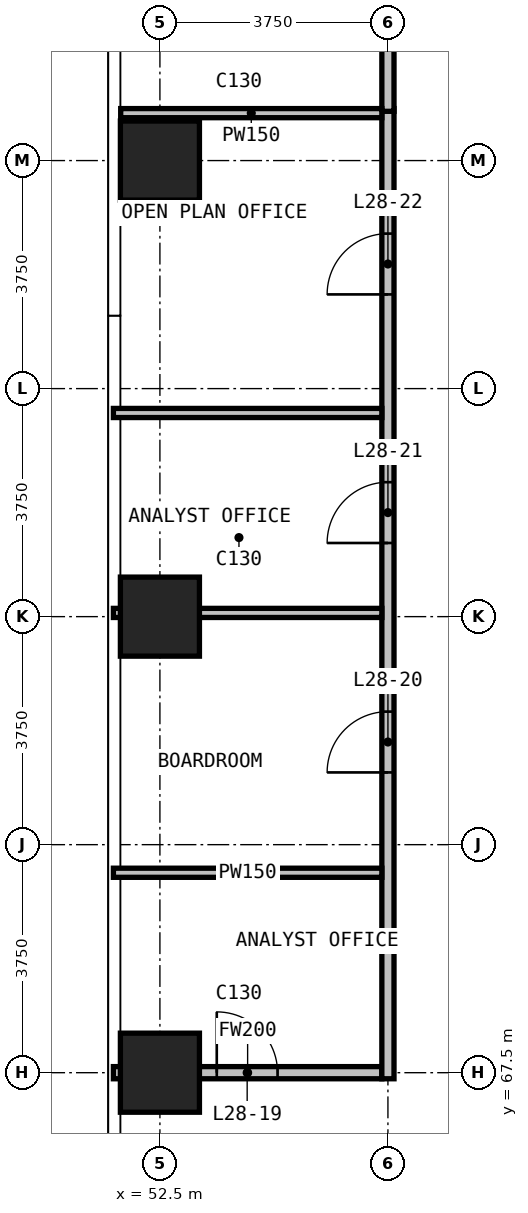
"""IFC4 building model, lengths in metres.
Left out: names, types, materials, properties, quantities, classifications, styles, units other than length and angle.
Written with IfcOpenShell. Run it as: python <this file> out.ifc"""

import sys

from ifc_helpers import new_model, si_unit, direction, frame, frame_2d, origin, origin_2d, place, context, subcontext, project, spatial, rectangle, extrude, element, fill, save


model = new_model("IFC4")
c1 = context("Model", 3, precision=1e-05, world=origin(), true_north=direction((0.0, 1.0)))
c2 = subcontext(c1, "Body", "Model", "MODEL_VIEW")
j1 = project(units=[si_unit("LENGTHUNIT", "METRE"), si_unit("PLANEANGLEUNIT", "RADIAN")], contexts=[c1])
p1 = place(None, origin())
s1 = spatial("IfcSite", under=j1, at=p1, CompositionType="ELEMENT")
p2 = place(p1, origin())
s2 = spatial("IfcBuilding", under=s1, at=p2, CompositionType="ELEMENT")
p3 = place(p2, frame((0.0, 0.0, 114.4)))
s3 = spatial("IfcBuildingStorey", under=s2, at=p3, CompositionType="ELEMENT", Elevation=114.4)
for number, where, z_axis, x_axis in (
    (1, (52.5, 67.5, 0.0), (0.0, 0.0, 1.0), (1.0, 0.0, 0.0)),
    (2, (52.5, 75.0, 0.0), (0.0, 0.0, 1.0), (1.0, 0.0, 0.0)),
    (3, (52.5, 82.5, 0.0), (0.0, 0.0, 1.0), (1.0, 0.0, 0.0)),
):
    element("IfcColumn", number, at=place(p3, frame(where, z_axis=z_axis, x_axis=x_axis)), inside=s3, PredefinedType="COLUMN", context=c2, shape_type="SweptSolid", body=[
        extrude(rectangle(XDim=1.3, YDim=1.3, at=origin_2d()), origin(), (0.0, 0.0, 1.0), 3.6),
    ])
p4 = place(p3, frame((51.735, 67.5, 0.0), z_axis=(0.0, 0.0, 1.0), x_axis=(1.0, 0.0, 0.0)))
e4 = element("IfcWall", 4, at=p4, inside=s3, PredefinedType="PARTITIONING", context=c2, shape_type="SweptSolid", body=[
    extrude(rectangle(XDim=4.415, YDim=0.2, at=frame_2d((2.208, 0.0))), origin(), (0.0, 0.0, 1.0), 3.3),
])
p5 = place(p4, frame((1.7, 0.0, 0.0)))
e5 = element("IfcOpeningElement", 5, at=p5, cuts=e4, PredefinedType="OPENING", context=c2, shape_type="SweptSolid", body=[
    extrude(rectangle(XDim=1.0, YDim=2.2, at=frame_2d((0.5, 1.1))), frame((0.0, 0.11, 0.0), z_axis=(0.0, -1.0, 0.0), x_axis=(1.0, 0.0, 0.0)), (0.0, 0.0, 1.0), 0.22),
])
p6 = place(p3, frame((56.25, 67.4, 0.0), z_axis=(0.0, 0.0, 1.0), x_axis=(0.0, 1.0, 0.0)))
e6 = element("IfcWall", 6, at=p6, inside=s3, PredefinedType="PARTITIONING", context=c2, shape_type="SweptSolid", body=[
    extrude(rectangle(XDim=15.955, YDim=0.2, at=frame_2d((7.978, 0.0))), origin(), (0.0, 0.0, 1.0), 3.3),
])
p7 = place(p6, frame((5.038, 0.0, 0.0)))
e7 = element("IfcOpeningElement", 7, at=p7, cuts=e6, PredefinedType="OPENING", context=c2, shape_type="SweptSolid", body=[
    extrude(rectangle(XDim=1.0, YDim=2.2, at=frame_2d((0.5, 1.1))), frame((0.0, 0.11, 0.0), z_axis=(0.0, -1.0, 0.0), x_axis=(1.0, 0.0, 0.0)), (0.0, 0.0, 1.0), 0.22),
])
p8 = place(p6, frame((8.811, 0.0, 0.0)))
e8 = element("IfcOpeningElement", 8, at=p8, cuts=e6, PredefinedType="OPENING", context=c2, shape_type="SweptSolid", body=[
    extrude(rectangle(XDim=1.0, YDim=2.2, at=frame_2d((0.5, 1.1))), frame((0.0, 0.11, 0.0), z_axis=(0.0, -1.0, 0.0), x_axis=(1.0, 0.0, 0.0)), (0.0, 0.0, 1.0), 0.22),
])
p9 = place(p6, frame((12.899, 0.0, 0.0)))
e9 = element("IfcOpeningElement", 9, at=p9, cuts=e6, PredefinedType="OPENING", context=c2, shape_type="SweptSolid", body=[
    extrude(rectangle(XDim=1.0, YDim=2.2, at=frame_2d((0.5, 1.1))), frame((0.0, 0.11, 0.0), z_axis=(0.0, -1.0, 0.0), x_axis=(1.0, 0.0, 0.0)), (0.0, 0.0, 1.0), 0.22),
])
p10 = place(p3, frame((56.25, 83.31, 0.0), z_axis=(0.0, 0.0, 1.0), x_axis=(0.0, 1.0, 0.0)))
e10 = element("IfcWall", 10, at=p10, inside=s3, PredefinedType="PARTITIONING", context=c2, shape_type="SweptSolid", body=[
    extrude(rectangle(XDim=7.335, YDim=0.2, at=frame_2d((3.667, 0.0))), origin(), (0.0, 0.0, 1.0), 3.3),
])
for number, where, z_axis, x_axis in (
    (11, (51.735, 70.788, 0.0), (0.0, 0.0, 1.0), (1.0, 0.0, 0.0)),
    (12, (51.735, 75.061, 0.0), (0.0, 0.0, 1.0), (1.0, 0.0, 0.0)),
    (13, (51.735, 78.349, 0.0), (0.0, 0.0, 1.0), (1.0, 0.0, 0.0)),
):
    element("IfcWall", number, at=place(p3, frame(where, z_axis=z_axis, x_axis=x_axis)), inside=s3, PredefinedType="PARTITIONING", context=c2, shape_type="SweptSolid", body=[
        extrude(rectangle(XDim=4.415, YDim=0.15, at=frame_2d((2.208, 0.0))), origin(), (0.0, 0.0, 1.0), 3.3),
    ])
p11 = place(p3, frame((51.855, 83.28, 0.0), z_axis=(0.0, 0.0, 1.0), x_axis=(1.0, 0.0, 0.0)))
e14 = element("IfcWall", 14, at=p11, inside=s3, PredefinedType="PARTITIONING", context=c2, shape_type="SweptSolid", body=[
    extrude(rectangle(XDim=4.295, YDim=0.15, at=frame_2d((2.147, 0.0))), origin(), (0.0, 0.0, 1.0), 3.3),
])
p12 = place(p5, origin())
e15 = element("IfcDoor", 15, at=p12, inside=s3, OperationType="SINGLE_SWING_LEFT", PredefinedType="DOOR", context=c2, shape_type="SweptSolid", body=[
    extrude(rectangle(XDim=1.0, YDim=2.2, at=frame_2d((0.5, 1.1))), frame((0.0, 0.025, 0.0), z_axis=(0.0, -1.0, 0.0), x_axis=(1.0, 0.0, 0.0)), (0.0, 0.0, 1.0), 0.05),
])
fill(e5, e15)
p13 = place(p7, origin())
e16 = element("IfcDoor", 16, at=p13, inside=s3, OperationType="SINGLE_SWING_LEFT", PredefinedType="DOOR", context=c2, shape_type="SweptSolid", body=[
    extrude(rectangle(XDim=1.0, YDim=2.2, at=frame_2d((0.5, 1.1))), frame((0.0, 0.025, 0.0), z_axis=(0.0, -1.0, 0.0), x_axis=(1.0, 0.0, 0.0)), (0.0, 0.0, 1.0), 0.05),
])
fill(e7, e16)
p14 = place(p8, origin())
e17 = element("IfcDoor", 17, at=p14, inside=s3, OperationType="SINGLE_SWING_RIGHT", PredefinedType="DOOR", context=c2, shape_type="SweptSolid", body=[
    extrude(rectangle(XDim=1.0, YDim=2.2, at=frame_2d((0.5, 1.1))), frame((0.0, 0.025, 0.0), z_axis=(0.0, -1.0, 0.0), x_axis=(1.0, 0.0, 0.0)), (0.0, 0.0, 1.0), 0.05),
])
fill(e8, e17)
p15 = place(p9, origin())
e18 = element("IfcDoor", 18, at=p15, inside=s3, OperationType="SINGLE_SWING_RIGHT", PredefinedType="DOOR", context=c2, shape_type="SweptSolid", body=[
    extrude(rectangle(XDim=1.0, YDim=2.2, at=frame_2d((0.5, 1.1))), frame((0.0, 0.025, 0.0), z_axis=(0.0, -1.0, 0.0), x_axis=(1.0, 0.0, 0.0)), (0.0, 0.0, 1.0), 0.05),
])
fill(e9, e18)
save(model, sys.argv[1])
